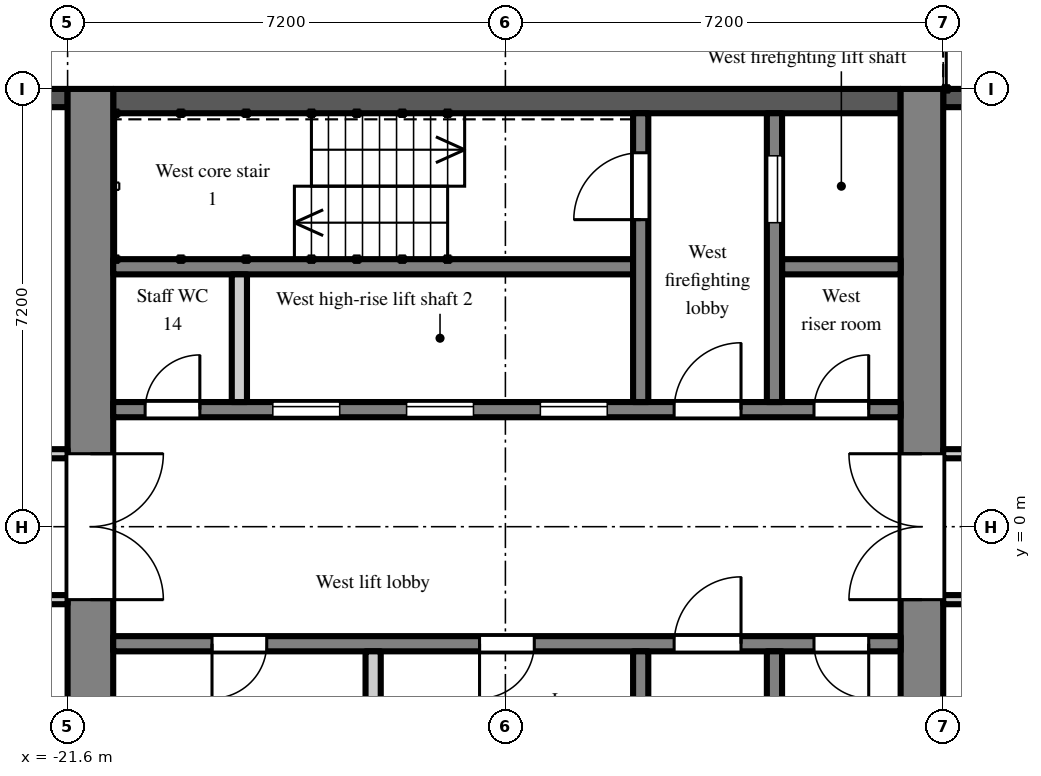
"""IFC4 building model, lengths in metres.
Left out: names, types, materials, properties, quantities, classifications, styles, units other than length and angle.
Written with IfcOpenShell. Run it as: python <this file> out.ifc"""

import sys

from ifc_helpers import new_model, si_unit, direction, frame, frame_2d, origin, place, context, subcontext, project, spatial, rectangle, extrude, element, fill, save


model = new_model("IFC4")
c1 = context("Model", 3, precision=1e-05, world=origin(), true_north=direction((0.0, 1.0)))
c2 = subcontext(c1, "Body", "Model", "MODEL_VIEW")
j1 = project(units=[si_unit("LENGTHUNIT", "METRE"), si_unit("PLANEANGLEUNIT", "RADIAN")], contexts=[c1])
p1 = place(None, origin())
s1 = spatial("IfcSite", under=j1, at=p1, CompositionType="ELEMENT")
p2 = place(p1, origin())
s2 = spatial("IfcBuilding", under=s1, at=p2, CompositionType="ELEMENT")
p3 = place(p2, frame((0.0, 0.0, 225.9)))
s3 = spatial("IfcBuildingStorey", under=s2, at=p3, CompositionType="ELEMENT", Elevation=225.9)
p4 = place(p3, frame((-4.2, 7.05, 0.0), z_axis=(0.0, 0.0, 1.0), x_axis=(-1.0, 0.0, 0.0)))
e1 = element("IfcWall", 1, at=p4, inside=s3, PredefinedType="SOLIDWALL", context=c2, shape_type="SweptSolid", body=[
    extrude(rectangle(XDim=3.0, YDim=0.3, at=frame_2d((1.5, 0.0))), origin(), (0.0, 0.0, 1.0), 2.3),
])
p5 = place(p3, frame((-21.6, 7.05, 0.0), z_axis=(0.0, 0.0, 1.0), x_axis=(-1.0, 0.0, 0.0)))
e2 = element("IfcWall", 2, at=p5, inside=s3, PredefinedType="SOLIDWALL", context=c2, shape_type="SweptSolid", body=[
    extrude(rectangle(XDim=2.7, YDim=0.3, at=frame_2d((1.35, 0.0))), origin(), (0.0, 0.0, 1.0), 2.3),
])
p6 = place(p5, frame((0.75, 0.0, 0.2)))
e3 = element("IfcOpeningElement", 3, at=p6, cuts=e2, PredefinedType="OPENING", context=c2, shape_type="SweptSolid", body=[
    extrude(rectangle(XDim=1.2, YDim=1.85, at=frame_2d((0.6, 0.925))), frame((0.0, 0.16, 0.0), z_axis=(0.0, -1.0, 0.0), x_axis=(1.0, 0.0, 0.0)), (0.0, 0.0, 1.0), 0.32),
])
p7 = place(p3, frame((-7.55, -7.2, 0.0), z_axis=(0.0, 0.0, 1.0), x_axis=(0.0, 1.0, 0.0)))
e4 = element("IfcWall", 4, at=p7, inside=s3, PredefinedType="SHEAR", context=c2, shape_type="SweptSolid", body=[
    extrude(rectangle(XDim=14.4, YDim=0.7, at=frame_2d((7.2, 0.0))), origin(), (0.0, 0.0, 1.0), 2.6),
])
p8 = place(p7, frame((6.0, 0.0, 0.0)))
e5 = element("IfcOpeningElement", 5, at=p8, cuts=e4, PredefinedType="OPENING", context=c2, shape_type="SweptSolid", body=[
    extrude(rectangle(XDim=2.4, YDim=2.2, at=frame_2d((1.2, 1.1))), frame((0.0, 0.36, 0.0), z_axis=(0.0, -1.0, 0.0), x_axis=(1.0, 0.0, 0.0)), (0.0, 0.0, 1.0), 0.72),
])
p9 = place(p3, frame((-21.225, -7.2, 0.0), z_axis=(0.0, 0.0, 1.0), x_axis=(0.0, 1.0, 0.0)))
e6 = element("IfcWall", 6, at=p9, inside=s3, PredefinedType="SHEAR", context=c2, shape_type="SweptSolid", body=[
    extrude(rectangle(XDim=14.4, YDim=0.75, at=frame_2d((7.2, 0.0))), origin(), (0.0, 0.0, 1.0), 2.6),
])
p10 = place(p9, frame((6.0, 0.0, 0.0)))
e7 = element("IfcOpeningElement", 7, at=p10, cuts=e6, PredefinedType="OPENING", context=c2, shape_type="SweptSolid", body=[
    extrude(rectangle(XDim=2.4, YDim=2.2, at=frame_2d((1.2, 1.1))), frame((0.0, 0.385, 0.0), z_axis=(0.0, -1.0, 0.0), x_axis=(1.0, 0.0, 0.0)), (0.0, 0.0, 1.0), 0.77),
])
p11 = place(p3, frame((-7.9, 7.0, 0.0), z_axis=(0.0, 0.0, 1.0), x_axis=(-1.0, 0.0, 0.0)))
e8 = element("IfcWall", 8, at=p11, inside=s3, PredefinedType="SHEAR", context=c2, shape_type="SweptSolid", body=[
    extrude(rectangle(XDim=12.95, YDim=0.4, at=frame_2d((6.475, 0.0))), origin(), (0.0, 0.0, 1.0), 2.6),
])
p12 = place(p3, frame((-7.9, 1.925, 0.0), z_axis=(0.0, 0.0, 1.0), x_axis=(-1.0, 0.0, 0.0)))
e9 = element("IfcWall", 9, at=p12, inside=s3, PredefinedType="SHEAR", context=c2, shape_type="SweptSolid", body=[
    extrude(rectangle(XDim=12.95, YDim=0.25, at=frame_2d((6.475, 0.0))), origin(), (0.0, 0.0, 1.0), 2.6),
])
p13 = place(p12, frame((4.825, 0.0, 0.0)))
e10 = element("IfcOpeningElement", 10, at=p13, cuts=e9, PredefinedType="OPENING", context=c2, shape_type="SweptSolid", body=[
    extrude(rectangle(XDim=1.1, YDim=2.1, at=frame_2d((0.55, 1.05))), frame((0.0, 0.135, 0.0), z_axis=(0.0, -1.0, 0.0), x_axis=(1.0, 0.0, 0.0)), (0.0, 0.0, 1.0), 0.27),
])
p14 = place(p12, frame((7.025, 0.0, 0.0)))
e11 = element("IfcOpeningElement", 11, at=p14, cuts=e9, PredefinedType="OPENING", context=c2, shape_type="SweptSolid", body=[
    extrude(rectangle(XDim=1.1, YDim=2.1, at=frame_2d((0.55, 1.05))), frame((0.0, 0.135, 0.0), z_axis=(0.0, -1.0, 0.0), x_axis=(1.0, 0.0, 0.0)), (0.0, 0.0, 1.0), 0.27),
])
p15 = place(p12, frame((9.225, 0.0, 0.0)))
e12 = element("IfcOpeningElement", 12, at=p15, cuts=e9, PredefinedType="OPENING", context=c2, shape_type="SweptSolid", body=[
    extrude(rectangle(XDim=1.1, YDim=2.1, at=frame_2d((0.55, 1.05))), frame((0.0, 0.135, 0.0), z_axis=(0.0, -1.0, 0.0), x_axis=(1.0, 0.0, 0.0)), (0.0, 0.0, 1.0), 0.27),
])
p16 = place(p12, frame((0.525, 0.0, 0.0)))
e13 = element("IfcOpeningElement", 13, at=p16, cuts=e9, PredefinedType="OPENING", context=c2, shape_type="SweptSolid", body=[
    extrude(rectangle(XDim=0.9, YDim=2.1, at=frame_2d((0.45, 1.05))), frame((0.0, 0.135, 0.0), z_axis=(0.0, -1.0, 0.0), x_axis=(1.0, 0.0, 0.0)), (0.0, 0.0, 1.0), 0.27),
])
p17 = place(p12, frame((2.625, 0.0, 0.0)))
e14 = element("IfcOpeningElement", 14, at=p17, cuts=e9, PredefinedType="OPENING", context=c2, shape_type="SweptSolid", body=[
    extrude(rectangle(XDim=1.1, YDim=2.1, at=frame_2d((0.55, 1.05))), frame((0.0, 0.135, 0.0), z_axis=(0.0, -1.0, 0.0), x_axis=(1.0, 0.0, 0.0)), (0.0, 0.0, 1.0), 0.27),
])
p18 = place(p12, frame((11.525, 0.0, 0.0)))
e15 = element("IfcOpeningElement", 15, at=p18, cuts=e9, PredefinedType="OPENING", context=c2, shape_type="SweptSolid", body=[
    extrude(rectangle(XDim=0.9, YDim=2.1, at=frame_2d((0.45, 1.05))), frame((0.0, 0.135, 0.0), z_axis=(0.0, -1.0, 0.0), x_axis=(1.0, 0.0, 0.0)), (0.0, 0.0, 1.0), 0.27),
])
p19 = place(p3, frame((-7.9, 4.275, 0.0), z_axis=(0.0, 0.0, 1.0), x_axis=(-1.0, 0.0, 0.0)))
e16 = element("IfcWall", 16, at=p19, inside=s3, PredefinedType="SHEAR", context=c2, shape_type="SweptSolid", body=[
    extrude(rectangle(XDim=1.95, YDim=0.25, at=frame_2d((0.975, 0.0))), origin(), (0.0, 0.0, 1.0), 2.6),
])
p20 = place(p3, frame((-12.3, 4.275, 0.0), z_axis=(0.0, 0.0, 1.0), x_axis=(-1.0, 0.0, 0.0)))
e17 = element("IfcWall", 17, at=p20, inside=s3, PredefinedType="SHEAR", context=c2, shape_type="SweptSolid", body=[
    extrude(rectangle(XDim=8.55, YDim=0.25, at=frame_2d((4.275, 0.0))), origin(), (0.0, 0.0, 1.0), 2.6),
])
p21 = place(p3, frame((-9.975, 2.05, 0.0), z_axis=(0.0, 0.0, 1.0), x_axis=(0.0, 1.0, 0.0)))
e18 = element("IfcWall", 18, at=p21, inside=s3, PredefinedType="SHEAR", context=c2, shape_type="SweptSolid", body=[
    extrude(rectangle(XDim=4.75, YDim=0.25, at=frame_2d((2.375, 0.0))), origin(), (0.0, 0.0, 1.0), 2.6),
])
p22 = place(p21, frame((2.95, 0.0, 0.0)))
e19 = element("IfcOpeningElement", 19, at=p22, cuts=e18, PredefinedType="OPENING", context=c2, shape_type="SweptSolid", body=[
    extrude(rectangle(XDim=1.1, YDim=2.1, at=frame_2d((0.55, 1.05))), frame((0.0, 0.135, 0.0), z_axis=(0.0, -1.0, 0.0), x_axis=(1.0, 0.0, 0.0)), (0.0, 0.0, 1.0), 0.27),
])
p23 = place(p3, frame((-12.175, 2.05, 0.0), z_axis=(0.0, 0.0, 1.0), x_axis=(0.0, 1.0, 0.0)))
e20 = element("IfcWall", 20, at=p23, inside=s3, PredefinedType="SHEAR", context=c2, shape_type="SweptSolid", body=[
    extrude(rectangle(XDim=4.75, YDim=0.25, at=frame_2d((2.375, 0.0))), origin(), (0.0, 0.0, 1.0), 2.6),
])
p24 = place(p23, frame((3.0, 0.0, 0.0)))
e21 = element("IfcOpeningElement", 21, at=p24, cuts=e20, PredefinedType="OPENING", context=c2, shape_type="SweptSolid", body=[
    extrude(rectangle(XDim=1.1, YDim=2.1, at=frame_2d((0.55, 1.05))), frame((0.0, 0.135, 0.0), z_axis=(0.0, -1.0, 0.0), x_axis=(1.0, 0.0, 0.0)), (0.0, 0.0, 1.0), 0.27),
])
p25 = place(p3, frame((-18.775, 2.05, 0.0), z_axis=(0.0, 0.0, 1.0), x_axis=(0.0, 1.0, 0.0)))
e22 = element("IfcWall", 22, at=p25, inside=s3, PredefinedType="PARTITIONING", context=c2, shape_type="SweptSolid", body=[
    extrude(rectangle(XDim=2.1, YDim=0.25, at=frame_2d((1.05, 0.0))), origin(), (0.0, 0.0, 1.0), 2.6),
])
p26 = place(p3, frame((-7.9, -1.925, 0.0), z_axis=(0.0, 0.0, 1.0), x_axis=(-1.0, 0.0, 0.0)))
e23 = element("IfcWall", 23, at=p26, inside=s3, PredefinedType="SHEAR", context=c2, shape_type="SweptSolid", body=[
    extrude(rectangle(XDim=12.95, YDim=0.25, at=frame_2d((6.475, 0.0))), origin(), (0.0, 0.0, 1.0), 2.6),
])
p27 = place(p26, frame((0.525, 0.0, 0.0)))
e24 = element("IfcOpeningElement", 24, at=p27, cuts=e23, PredefinedType="OPENING", context=c2, shape_type="SweptSolid", body=[
    extrude(rectangle(XDim=0.9, YDim=2.1, at=frame_2d((0.45, 1.05))), frame((0.0, 0.135, 0.0), z_axis=(0.0, -1.0, 0.0), x_axis=(1.0, 0.0, 0.0)), (0.0, 0.0, 1.0), 0.27),
])
p28 = place(p26, frame((2.625, 0.0, 0.0)))
e25 = element("IfcOpeningElement", 25, at=p28, cuts=e23, PredefinedType="OPENING", context=c2, shape_type="SweptSolid", body=[
    extrude(rectangle(XDim=1.1, YDim=2.1, at=frame_2d((0.55, 1.05))), frame((0.0, 0.135, 0.0), z_axis=(0.0, -1.0, 0.0), x_axis=(1.0, 0.0, 0.0)), (0.0, 0.0, 1.0), 0.27),
])
p29 = place(p26, frame((6.025, 0.0, 0.0)))
e26 = element("IfcOpeningElement", 26, at=p29, cuts=e23, PredefinedType="OPENING", context=c2, shape_type="SweptSolid", body=[
    extrude(rectangle(XDim=0.9, YDim=2.1, at=frame_2d((0.45, 1.05))), frame((0.0, 0.135, 0.0), z_axis=(0.0, -1.0, 0.0), x_axis=(1.0, 0.0, 0.0)), (0.0, 0.0, 1.0), 0.27),
])
p30 = place(p26, frame((10.425, 0.0, 0.0)))
e27 = element("IfcOpeningElement", 27, at=p30, cuts=e23, PredefinedType="OPENING", context=c2, shape_type="SweptSolid", body=[
    extrude(rectangle(XDim=0.9, YDim=2.1, at=frame_2d((0.45, 1.05))), frame((0.0, 0.135, 0.0), z_axis=(0.0, -1.0, 0.0), x_axis=(1.0, 0.0, 0.0)), (0.0, 0.0, 1.0), 0.27),
])
p31 = place(p3, frame((-9.975, -2.05, 0.0), z_axis=(0.0, 0.0, 1.0), x_axis=(0.0, -1.0, 0.0)))
e28 = element("IfcWall", 28, at=p31, inside=s3, PredefinedType="SHEAR", context=c2, shape_type="SweptSolid", body=[
    extrude(rectangle(XDim=4.75, YDim=0.25, at=frame_2d((2.375, 0.0))), origin(), (0.0, 0.0, 1.0), 2.6),
])
p32 = place(p31, frame((2.95, 0.0, 0.0)))
e29 = element("IfcOpeningElement", 29, at=p32, cuts=e28, PredefinedType="OPENING", context=c2, shape_type="SweptSolid", body=[
    extrude(rectangle(XDim=1.1, YDim=2.1, at=frame_2d((0.55, 1.05))), frame((0.0, 0.135, 0.0), z_axis=(0.0, -1.0, 0.0), x_axis=(1.0, 0.0, 0.0)), (0.0, 0.0, 1.0), 0.27),
])
p33 = place(p3, frame((-12.175, -2.05, 0.0), z_axis=(0.0, 0.0, 1.0), x_axis=(0.0, -1.0, 0.0)))
e30 = element("IfcWall", 30, at=p33, inside=s3, PredefinedType="SHEAR", context=c2, shape_type="SweptSolid", body=[
    extrude(rectangle(XDim=4.75, YDim=0.25, at=frame_2d((2.375, 0.0))), origin(), (0.0, 0.0, 1.0), 2.6),
])
p34 = place(p33, frame((3.0, 0.0, 0.0)))
e31 = element("IfcOpeningElement", 31, at=p34, cuts=e30, PredefinedType="OPENING", context=c2, shape_type="SweptSolid", body=[
    extrude(rectangle(XDim=1.1, YDim=2.1, at=frame_2d((0.55, 1.05))), frame((0.0, 0.135, 0.0), z_axis=(0.0, -1.0, 0.0), x_axis=(1.0, 0.0, 0.0)), (0.0, 0.0, 1.0), 0.27),
])
p35 = place(p3, frame((-16.575, -2.05, 0.0), z_axis=(0.0, 0.0, 1.0), x_axis=(0.0, -1.0, 0.0)))
e32 = element("IfcWall", 32, at=p35, inside=s3, PredefinedType="PARTITIONING", context=c2, shape_type="SweptSolid", body=[
    extrude(rectangle(XDim=2.1, YDim=0.25, at=frame_2d((1.05, 0.0))), origin(), (0.0, 0.0, 1.0), 2.6),
])
p36 = place(p3, frame((-26.725, -1.2, 0.0), z_axis=(0.0, 0.0, 1.0), x_axis=(1.0, 0.0, 0.0)))
e33 = element("IfcWall", 33, at=p36, inside=s3, PredefinedType="PARTITIONING", context=c2, shape_type="SweptSolid", body=[
    extrude(rectangle(XDim=5.125, YDim=0.15, at=frame_2d((2.562, 0.0))), origin(), (0.0, 0.0, 1.0), 2.6),
])
p37 = place(p36, frame((3.525, 0.0, 0.0)))
e34 = element("IfcOpeningElement", 34, at=p37, cuts=e33, PredefinedType="OPENING", context=c2, shape_type="SweptSolid", body=[
    extrude(rectangle(XDim=1.0, YDim=2.1, at=frame_2d((0.5, 1.05))), frame((0.0, 0.085, 0.0), z_axis=(0.0, -1.0, 0.0), x_axis=(1.0, 0.0, 0.0)), (0.0, 0.0, 1.0), 0.17),
])
p38 = place(p36, frame((0.275, 0.0, 0.0)))
e35 = element("IfcOpeningElement", 35, at=p38, cuts=e33, PredefinedType="OPENING", context=c2, shape_type="SweptSolid", body=[
    extrude(rectangle(XDim=0.9, YDim=2.1, at=frame_2d((0.45, 1.05))), frame((0.0, 0.085, 0.0), z_axis=(0.0, -1.0, 0.0), x_axis=(1.0, 0.0, 0.0)), (0.0, 0.0, 1.0), 0.17),
])
p39 = place(p3, frame((-26.725, 1.2, 0.0), z_axis=(0.0, 0.0, 1.0), x_axis=(1.0, 0.0, 0.0)))
e36 = element("IfcWall", 36, at=p39, inside=s3, PredefinedType="PARTITIONING", context=c2, shape_type="SweptSolid", body=[
    extrude(rectangle(XDim=5.125, YDim=0.15, at=frame_2d((2.562, 0.0))), origin(), (0.0, 0.0, 1.0), 2.6),
])
p40 = place(p39, frame((1.625, 0.0, 0.0)))
e37 = element("IfcOpeningElement", 37, at=p40, cuts=e36, PredefinedType="OPENING", context=c2, shape_type="SweptSolid", body=[
    extrude(rectangle(XDim=1.8, YDim=2.1, at=frame_2d((0.9, 1.05))), frame((0.0, 0.085, 0.0), z_axis=(0.0, -1.0, 0.0), x_axis=(1.0, 0.0, 0.0)), (0.0, 0.0, 1.0), 0.17),
])
p41 = place(p3, frame((-7.2, -1.2, 0.0), z_axis=(0.0, 0.0, 1.0), x_axis=(1.0, 0.0, 0.0)))
e38 = element("IfcWall", 38, at=p41, inside=s3, PredefinedType="PARTITIONING", context=c2, shape_type="SweptSolid", body=[
    extrude(rectangle(XDim=6.075, YDim=0.15, at=frame_2d((3.038, 0.0))), origin(), (0.0, 0.0, 1.0), 2.6),
])
p42 = place(p41, frame((0.55, 0.0, 0.0)))
e39 = element("IfcOpeningElement", 39, at=p42, cuts=e38, PredefinedType="OPENING", context=c2, shape_type="SweptSolid", body=[
    extrude(rectangle(XDim=0.9, YDim=2.1, at=frame_2d((0.45, 1.05))), frame((0.0, 0.085, 0.0), z_axis=(0.0, -1.0, 0.0), x_axis=(1.0, 0.0, 0.0)), (0.0, 0.0, 1.0), 0.17),
])
p43 = place(p3, frame((-7.2, 1.2, 0.0), z_axis=(0.0, 0.0, 1.0), x_axis=(1.0, 0.0, 0.0)))
e40 = element("IfcWall", 40, at=p43, inside=s3, PredefinedType="PARTITIONING", context=c2, shape_type="SweptSolid", body=[
    extrude(rectangle(XDim=6.075, YDim=0.15, at=frame_2d((3.038, 0.0))), origin(), (0.0, 0.0, 1.0), 2.6),
])
p44 = place(p43, frame((1.95, 0.0, 0.0)))
e41 = element("IfcOpeningElement", 41, at=p44, cuts=e40, PredefinedType="OPENING", context=c2, shape_type="SweptSolid", body=[
    extrude(rectangle(XDim=0.9, YDim=2.1, at=frame_2d((0.45, 1.05))), frame((0.0, 0.085, 0.0), z_axis=(0.0, -1.0, 0.0), x_axis=(1.0, 0.0, 0.0)), (0.0, 0.0, 1.0), 0.17),
])
p45 = place(p13, origin())
e42 = element("IfcDoor", 42, at=p45, inside=s3, OperationType="SLIDING_TO_LEFT", PredefinedType="DOOR", context=c2, shape_type="SweptSolid", body=[
    extrude(rectangle(XDim=1.1, YDim=2.1, at=frame_2d((0.55, 1.05))), frame((0.0, 0.025, 0.0), z_axis=(0.0, -1.0, 0.0), x_axis=(1.0, 0.0, 0.0)), (0.0, 0.0, 1.0), 0.05),
])
fill(e10, e42)
p46 = place(p14, origin())
e43 = element("IfcDoor", 43, at=p46, inside=s3, OperationType="SLIDING_TO_LEFT", PredefinedType="DOOR", context=c2, shape_type="SweptSolid", body=[
    extrude(rectangle(XDim=1.1, YDim=2.1, at=frame_2d((0.55, 1.05))), frame((0.0, 0.025, 0.0), z_axis=(0.0, -1.0, 0.0), x_axis=(1.0, 0.0, 0.0)), (0.0, 0.0, 1.0), 0.05),
])
fill(e11, e43)
p47 = place(p15, origin())
e44 = element("IfcDoor", 44, at=p47, inside=s3, OperationType="SLIDING_TO_LEFT", PredefinedType="DOOR", context=c2, shape_type="SweptSolid", body=[
    extrude(rectangle(XDim=1.1, YDim=2.1, at=frame_2d((0.55, 1.05))), frame((0.0, 0.025, 0.0), z_axis=(0.0, -1.0, 0.0), x_axis=(1.0, 0.0, 0.0)), (0.0, 0.0, 1.0), 0.05),
])
fill(e12, e44)
p48 = place(p22, origin())
e45 = element("IfcDoor", 45, at=p48, inside=s3, OperationType="SLIDING_TO_LEFT", PredefinedType="DOOR", context=c2, shape_type="SweptSolid", body=[
    extrude(rectangle(XDim=1.1, YDim=2.1, at=frame_2d((0.55, 1.05))), frame((0.0, 0.025, 0.0), z_axis=(0.0, -1.0, 0.0), x_axis=(1.0, 0.0, 0.0)), (0.0, 0.0, 1.0), 0.05),
])
fill(e19, e45)
p49 = place(p24, origin())
e46 = element("IfcDoor", 46, at=p49, inside=s3, OperationType="SINGLE_SWING_LEFT", PredefinedType="DOOR", context=c2, shape_type="SweptSolid", body=[
    extrude(rectangle(XDim=1.1, YDim=2.1, at=frame_2d((0.55, 1.05))), frame((0.0, 0.025, 0.0), z_axis=(0.0, -1.0, 0.0), x_axis=(1.0, 0.0, 0.0)), (0.0, 0.0, 1.0), 0.05),
])
fill(e21, e46)
p50 = place(p16, frame((0.9, 0.0, 0.0), z_axis=(0.0, 0.0, 1.0), x_axis=(-1.0, 0.0, 0.0)))
e47 = element("IfcDoor", 47, at=p50, inside=s3, OperationType="SINGLE_SWING_RIGHT", PredefinedType="DOOR", context=c2, shape_type="SweptSolid", body=[
    extrude(rectangle(XDim=0.9, YDim=2.1, at=frame_2d((0.45, 1.05))), frame((0.0, 0.025, 0.0), z_axis=(0.0, -1.0, 0.0), x_axis=(1.0, 0.0, 0.0)), (0.0, 0.0, 1.0), 0.05),
])
fill(e13, e47)
p51 = place(p27, origin())
e48 = element("IfcDoor", 48, at=p51, inside=s3, OperationType="SINGLE_SWING_LEFT", PredefinedType="DOOR", context=c2, shape_type="SweptSolid", body=[
    extrude(rectangle(XDim=0.9, YDim=2.1, at=frame_2d((0.45, 1.05))), frame((0.0, 0.025, 0.0), z_axis=(0.0, -1.0, 0.0), x_axis=(1.0, 0.0, 0.0)), (0.0, 0.0, 1.0), 0.05),
])
fill(e24, e48)
p52 = place(p17, frame((1.1, 0.0, 0.0), z_axis=(0.0, 0.0, 1.0), x_axis=(-1.0, 0.0, 0.0)))
e49 = element("IfcDoor", 49, at=p52, inside=s3, OperationType="SINGLE_SWING_RIGHT", PredefinedType="DOOR", context=c2, shape_type="SweptSolid", body=[
    extrude(rectangle(XDim=1.1, YDim=2.1, at=frame_2d((0.55, 1.05))), frame((0.0, 0.025, 0.0), z_axis=(0.0, -1.0, 0.0), x_axis=(1.0, 0.0, 0.0)), (0.0, 0.0, 1.0), 0.05),
])
fill(e14, e49)
p53 = place(p28, frame((1.1, 0.0, 0.0), z_axis=(0.0, 0.0, 1.0), x_axis=(-1.0, 0.0, 0.0)))
e50 = element("IfcDoor", 50, at=p53, inside=s3, OperationType="SINGLE_SWING_RIGHT", PredefinedType="DOOR", context=c2, shape_type="SweptSolid", body=[
    extrude(rectangle(XDim=1.1, YDim=2.1, at=frame_2d((0.55, 1.05))), frame((0.0, 0.025, 0.0), z_axis=(0.0, -1.0, 0.0), x_axis=(1.0, 0.0, 0.0)), (0.0, 0.0, 1.0), 0.05),
])
fill(e25, e50)
p54 = place(p8, origin())
e51 = element("IfcDoor", 51, at=p54, inside=s3, OperationType="DOUBLE_DOOR_DOUBLE_SWING", PredefinedType="DOOR", context=c2, shape_type="SweptSolid", body=[
    extrude(rectangle(XDim=2.4, YDim=2.2, at=frame_2d((1.2, 1.1))), frame((0.0, 0.025, 0.0), z_axis=(0.0, -1.0, 0.0), x_axis=(1.0, 0.0, 0.0)), (0.0, 0.0, 1.0), 0.05),
])
fill(e5, e51)
p55 = place(p10, frame((2.4, 0.0, 0.0), z_axis=(0.0, 0.0, 1.0), x_axis=(-1.0, 0.0, 0.0)))
e52 = element("IfcDoor", 52, at=p55, inside=s3, OperationType="DOUBLE_DOOR_DOUBLE_SWING", PredefinedType="DOOR", context=c2, shape_type="SweptSolid", body=[
    extrude(rectangle(XDim=2.4, YDim=2.2, at=frame_2d((1.2, 1.1))), frame((0.0, 0.025, 0.0), z_axis=(0.0, -1.0, 0.0), x_axis=(1.0, 0.0, 0.0)), (0.0, 0.0, 1.0), 0.05),
])
fill(e7, e52)
p56 = place(p18, frame((0.9, 0.0, 0.0), z_axis=(0.0, 0.0, 1.0), x_axis=(-1.0, 0.0, 0.0)))
e53 = element("IfcDoor", 53, at=p56, inside=s3, OperationType="SINGLE_SWING_RIGHT", PredefinedType="DOOR", context=c2, shape_type="SweptSolid", body=[
    extrude(rectangle(XDim=0.9, YDim=2.1, at=frame_2d((0.45, 1.05))), frame((0.0, 0.025, 0.0), z_axis=(0.0, -1.0, 0.0), x_axis=(1.0, 0.0, 0.0)), (0.0, 0.0, 1.0), 0.05),
])
fill(e15, e53)
p57 = place(p29, origin())
e54 = element("IfcDoor", 54, at=p57, inside=s3, OperationType="SINGLE_SWING_RIGHT", PredefinedType="DOOR", context=c2, shape_type="SweptSolid", body=[
    extrude(rectangle(XDim=0.9, YDim=2.1, at=frame_2d((0.45, 1.05))), frame((0.0, 0.025, 0.0), z_axis=(0.0, -1.0, 0.0), x_axis=(1.0, 0.0, 0.0)), (0.0, 0.0, 1.0), 0.05),
])
fill(e26, e54)
p58 = place(p30, origin())
e55 = element("IfcDoor", 55, at=p58, inside=s3, OperationType="SINGLE_SWING_RIGHT", PredefinedType="DOOR", context=c2, shape_type="SweptSolid", body=[
    extrude(rectangle(XDim=0.9, YDim=2.1, at=frame_2d((0.45, 1.05))), frame((0.0, 0.025, 0.0), z_axis=(0.0, -1.0, 0.0), x_axis=(1.0, 0.0, 0.0)), (0.0, 0.0, 1.0), 0.05),
])
fill(e27, e55)
save(model, sys.argv[1])
